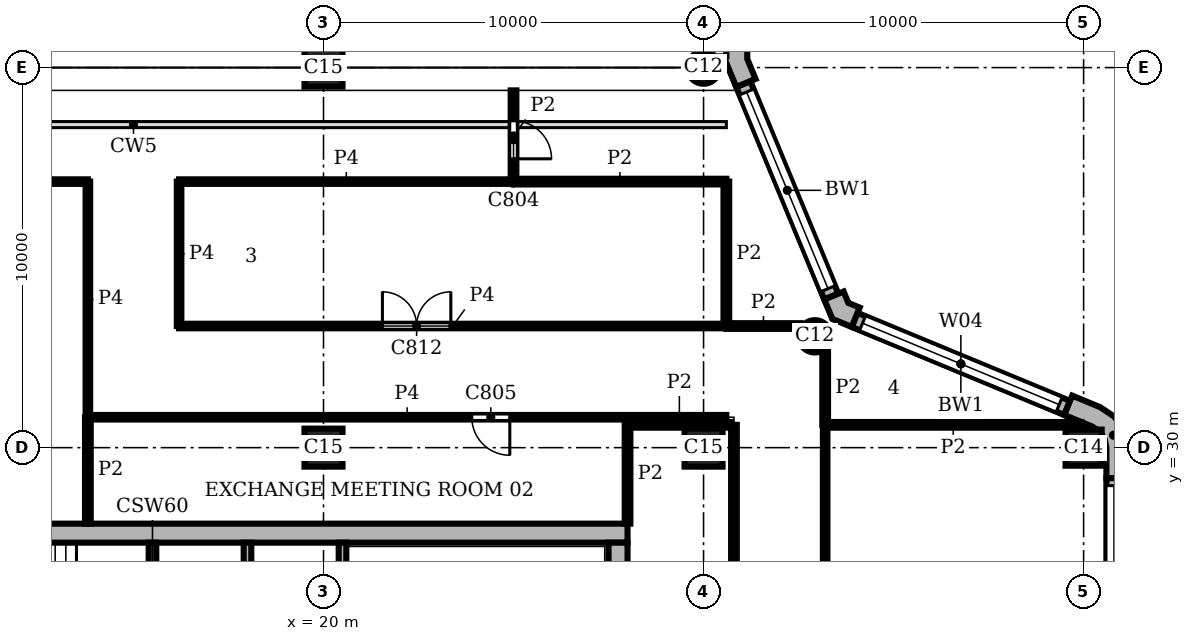
"""IFC4 building model, lengths in metres.
Left out: names, types, materials, properties, quantities, classifications, styles, units other than length and angle.
Written with IfcOpenShell. Run it as: python <this file> out.ifc"""

import sys

from ifc_helpers import new_model, si_unit, direction, frame, frame_2d, origin, origin_2d, place, context, subcontext, project, spatial, polyline, rectangle, circle, outline, extrude, element, fill, save


model = new_model("IFC4")
c1 = context("Model", 3, precision=1e-05, world=origin(), true_north=direction((0.0, 1.0)))
c2 = subcontext(c1, "Body", "Model", "MODEL_VIEW")
j1 = project(units=[si_unit("LENGTHUNIT", "METRE"), si_unit("PLANEANGLEUNIT", "RADIAN")], contexts=[c1])
p1 = place(None, origin())
s1 = spatial("IfcSite", under=j1, at=p1, CompositionType="ELEMENT")
p2 = place(p1, origin())
s2 = spatial("IfcBuilding", under=s1, at=p2, CompositionType="ELEMENT")
p3 = place(p2, frame((0.0, 0.0, 317.7)))
s3 = spatial("IfcBuildingStorey", under=s2, at=p3, CompositionType="ELEMENT", Elevation=317.7)
p4 = place(p3, frame((40.0, 30.0, 0.0), z_axis=(0.0, 0.0, 1.0), x_axis=(1.0, 0.0, 0.0)))
e1 = element("IfcColumn", 1, at=p4, inside=s3, PredefinedType="COLUMN", context=c2, shape_type="SweptSolid", body=[
    extrude(rectangle(XDim=0.95, YDim=0.95, at=origin_2d()), origin(), (0.0, 0.0, 1.0), 3.9),
])
for number, where, z_axis, x_axis in (
    (2, (32.929, 32.929, 0.0), (0.0, 0.0, 1.0), (1.0, 0.0, 0.0)),
    (3, (30.0, 40.0, 0.0), (0.0, 0.0, 1.0), (1.0, 0.0, 0.0)),
):
    element("IfcColumn", number, at=place(p3, frame(where, z_axis=z_axis, x_axis=x_axis)), inside=s3, PredefinedType="COLUMN", context=c2, shape_type="SweptSolid", body=[
        extrude(circle(Radius=0.425, at=origin_2d()), origin(), (0.0, 0.0, 1.0), 3.9),
    ])
for number, where, z_axis, x_axis in (
    (4, (20.0, 30.0, 0.0), (0.0, 0.0, 1.0), (1.0, 0.0, 0.0)),
    (5, (20.0, 40.0, 0.0), (0.0, 0.0, 1.0), (1.0, 0.0, 0.0)),
    (6, (30.0, 30.0, 0.0), (0.0, 0.0, 1.0), (1.0, 0.0, 0.0)),
):
    element("IfcColumn", number, at=place(p3, frame(where, z_axis=z_axis, x_axis=x_axis)), inside=s3, PredefinedType="COLUMN", context=c2, shape_type="SweptSolid", body=[
        extrude(rectangle(XDim=1.0, YDim=1.0, at=origin_2d()), origin(), (0.0, 0.0, 1.0), 3.9),
    ])
p5 = place(p3, frame((27.75, 8.5, 0.0), z_axis=(0.0, 0.0, 1.0), x_axis=(0.0, 1.0, 0.0)))
e7 = element("IfcWall", 7, at=p5, inside=s3, PredefinedType="SHEAR", context=c2, shape_type="SweptSolid", body=[
    extrude(rectangle(XDim=19.0, YDim=0.5, at=frame_2d((9.5, 0.0))), origin(), (0.0, 0.0, 1.0), 3.9),
])
p6 = place(p5, frame((4.95, 0.0, 0.0)))
e8 = element("IfcOpeningElement", 8, at=p6, cuts=e7, PredefinedType="OPENING", context=c2, shape_type="SweptSolid", body=[
    extrude(rectangle(XDim=1.6, YDim=2.1, at=frame_2d((0.8, 1.05))), frame((0.0, 0.26, 0.0), z_axis=(0.0, -1.0, 0.0), x_axis=(1.0, 0.0, 0.0)), (0.0, 0.0, 1.0), 0.52),
])
p7 = place(p3, frame((28.0, 27.75, 0.0), z_axis=(0.0, 0.0, 1.0), x_axis=(-1.0, 0.0, 0.0)))
e9 = element("IfcWall", 9, at=p7, inside=s3, PredefinedType="SHEAR", context=c2, shape_type="SweptSolid", body=[
    extrude(rectangle(XDim=20.0, YDim=0.5, at=frame_2d((10.0, 0.0))), origin(), (0.0, 0.0, 1.0), 3.9),
])
p8 = place(p3, origin())
e10 = element("IfcWall", 10, at=p8, inside=s3, PredefinedType="SOLIDWALL", context=c2, shape_type="SweptSolid", body=[
    extrude(outline(polyline([(41.0, 29.2), (41.15, 29.2), (41.15, 30.0), (41.062, 30.44), (40.813, 30.813), (40.44, 31.062), (39.701, 31.369), (39.644, 31.23), (39.49, 30.861), (40.229, 30.554), (40.424, 30.424), (40.554, 30.229), (40.6, 30.0), (40.6, 29.2), (41.0, 29.2)])), origin(), (0.0, 0.0, 1.0), 3.9),
])
e11 = element("IfcWall", 11, at=p8, inside=s3, PredefinedType="SOLIDWALL", context=c2, shape_type="SweptSolid", body=[
    extrude(outline(polyline([(34.051, 33.547), (34.108, 33.685), (33.809, 33.809), (33.685, 34.108), (33.547, 34.051), (33.177, 33.898), (33.388, 33.388), (33.898, 33.177), (34.051, 33.547)])), origin(), (0.0, 0.0, 1.0), 3.9),
])
e12 = element("IfcWall", 12, at=p8, inside=s3, PredefinedType="SOLIDWALL", context=c2, shape_type="SweptSolid", body=[
    extrude(outline(polyline([(30.62, 39.995), (30.62, 40.071), (30.861, 39.49), (31.23, 39.644), (31.369, 39.701), (31.15, 40.229), (31.15, 40.8), (31.0, 40.8), (30.6, 40.8), (30.6, 40.295), (30.425, 40.295), (30.425, 39.995), (30.62, 39.995)])), origin(), (0.0, 0.0, 1.0), 3.9),
])
p9 = place(p3, frame((40.8, 0.8, 0.0), z_axis=(0.0, 0.0, 1.0), x_axis=(0.0, 1.0, 0.0)))
e13 = element("IfcWall", 13, at=p9, inside=s3, PredefinedType="SOLIDWALL", context=c2, shape_type="SweptSolid", body=[
    extrude(rectangle(XDim=28.4, YDim=0.4, at=frame_2d((14.2, 0.0))), origin(), (0.0, 0.0, 1.0), 3.9),
])
p10 = place(p9, frame((0.2, 0.0, 0.9)))
e14 = element("IfcOpeningElement", 14, at=p10, cuts=e13, PredefinedType="OPENING", context=c2, shape_type="SweptSolid", body=[
    extrude(rectangle(XDim=8.0, YDim=2.35, at=frame_2d((4.0, 1.175))), frame((0.0, 0.21, 0.0), z_axis=(0.0, -1.0, 0.0), x_axis=(1.0, 0.0, 0.0)), (0.0, 0.0, 1.0), 0.42),
])
p11 = place(p9, frame((10.2, 0.0, 0.9)))
e15 = element("IfcOpeningElement", 15, at=p11, cuts=e13, PredefinedType="OPENING", context=c2, shape_type="SweptSolid", body=[
    extrude(rectangle(XDim=8.0, YDim=2.35, at=frame_2d((4.0, 1.175))), frame((0.0, 0.21, 0.0), z_axis=(0.0, -1.0, 0.0), x_axis=(1.0, 0.0, 0.0)), (0.0, 0.0, 1.0), 0.42),
])
p12 = place(p9, frame((20.2, 0.0, 0.9)))
e16 = element("IfcOpeningElement", 16, at=p12, cuts=e13, PredefinedType="OPENING", context=c2, shape_type="SweptSolid", body=[
    extrude(rectangle(XDim=8.0, YDim=2.35, at=frame_2d((4.0, 1.175))), frame((0.0, 0.21, 0.0), z_axis=(0.0, -1.0, 0.0), x_axis=(1.0, 0.0, 0.0)), (0.0, 0.0, 1.0), 0.42),
])
p13 = place(p3, frame((39.567, 31.045, 0.0), z_axis=(0.0, 0.0, 1.0), x_axis=(-0.923891000409, 0.382655745237, 0.0)))
e17 = element("IfcWall", 17, at=p13, inside=s3, PredefinedType="SOLIDWALL", context=c2, shape_type="SweptSolid", body=[
    extrude(rectangle(XDim=6.053, YDim=0.4, at=frame_2d((3.027, 0.0))), origin(), (0.0, 0.0, 1.0), 3.9),
])
p14 = place(p13, frame((0.227, 0.0, 0.9)))
e18 = element("IfcOpeningElement", 18, at=p14, cuts=e17, PredefinedType="OPENING", context=c2, shape_type="SweptSolid", body=[
    extrude(rectangle(XDim=5.6, YDim=2.35, at=frame_2d((2.8, 1.175))), frame((0.0, 0.21, 0.0), z_axis=(0.0, -1.0, 0.0), x_axis=(1.0, 0.0, 0.0)), (0.0, 0.0, 1.0), 0.42),
])
p15 = place(p3, frame((33.362, 33.974, 0.0), z_axis=(0.0, 0.0, 1.0), x_axis=(-0.382655745237, 0.923891000409, 0.0)))
e19 = element("IfcWall", 19, at=p15, inside=s3, PredefinedType="SOLIDWALL", context=c2, shape_type="SweptSolid", body=[
    extrude(rectangle(XDim=6.053, YDim=0.4, at=frame_2d((3.027, 0.0))), origin(), (0.0, 0.0, 1.0), 3.9),
])
p16 = place(p15, frame((0.227, 0.0, 0.9)))
e20 = element("IfcOpeningElement", 20, at=p16, cuts=e19, PredefinedType="OPENING", context=c2, shape_type="SweptSolid", body=[
    extrude(rectangle(XDim=5.6, YDim=2.35, at=frame_2d((2.8, 1.175))), frame((0.0, 0.21, 0.0), z_axis=(0.0, -1.0, 0.0), x_axis=(1.0, 0.0, 0.0)), (0.0, 0.0, 1.0), 0.42),
])
p17 = place(p3, frame((15.5, 23.6, 0.0), z_axis=(0.0, 0.0, 1.0), x_axis=(0.0, 1.0, 0.0)))
e21 = element("IfcWall", 21, at=p17, inside=s3, PredefinedType="SHEAR", context=c2, shape_type="SweptSolid", body=[
    extrude(rectangle(XDim=3.9, YDim=0.2, at=frame_2d((1.95, 0.0))), origin(), (0.0, 0.0, 1.0), 3.58),
])
p18 = place(p3, frame((18.0, 20.0, 0.0), z_axis=(0.0, 0.0, 1.0), x_axis=(0.0, 1.0, 0.0)))
e22 = element("IfcWall", 22, at=p18, inside=s3, PredefinedType="SHEAR", context=c2, shape_type="SweptSolid", body=[
    extrude(rectangle(XDim=7.5, YDim=0.2, at=frame_2d((3.75, 0.0))), origin(), (0.0, 0.0, 1.0), 3.58),
])
p19 = place(p18, frame((1.2, 0.0, 0.0)))
e23 = element("IfcOpeningElement", 23, at=p19, cuts=e22, PredefinedType="OPENING", context=c2, shape_type="SweptSolid", body=[
    extrude(rectangle(XDim=1.2, YDim=2.1, at=frame_2d((0.6, 1.05))), frame((0.0, 0.11, 0.0), z_axis=(0.0, -1.0, 0.0), x_axis=(1.0, 0.0, 0.0)), (0.0, 0.0, 1.0), 0.22),
])
p20 = place(p3, frame((20.5, 23.6, 0.0), z_axis=(0.0, 0.0, 1.0), x_axis=(0.0, 1.0, 0.0)))
e24 = element("IfcWall", 24, at=p20, inside=s3, PredefinedType="SHEAR", context=c2, shape_type="SweptSolid", body=[
    extrude(rectangle(XDim=3.9, YDim=0.2, at=frame_2d((1.95, 0.0))), origin(), (0.0, 0.0, 1.0), 3.58),
])
p21 = place(p3, frame((13.8, 28.0, 0.0), z_axis=(0.0, 0.0, 1.0), x_axis=(0.0, 1.0, 0.0)))
e25 = element("IfcWall", 25, at=p21, inside=s3, PredefinedType="PARTITIONING", context=c2, shape_type="SweptSolid", body=[
    extrude(rectangle(XDim=2.801, YDim=0.15, at=frame_2d((1.4, 0.0))), origin(), (0.0, 0.0, 1.0), 3.58),
])
p22 = place(p3, frame((25.0, 37.0, 0.0), z_axis=(0.0, 0.0, 1.0), x_axis=(0.0, 1.0, 0.0)))
e26 = element("IfcWall", 26, at=p22, inside=s3, PredefinedType="PARTITIONING", context=c2, shape_type="SweptSolid", body=[
    extrude(rectangle(XDim=2.4, YDim=0.15, at=frame_2d((1.2, 0.0))), origin(), (0.0, 0.0, 1.0), 3.58),
])
p23 = place(p22, frame((0.6, 0.0, 0.0)))
e27 = element("IfcOpeningElement", 27, at=p23, cuts=e26, PredefinedType="OPENING", context=c2, shape_type="SweptSolid", body=[
    extrude(rectangle(XDim=1.0, YDim=2.1, at=frame_2d((0.5, 1.05))), frame((0.0, 0.085, 0.0), z_axis=(0.0, -1.0, 0.0), x_axis=(1.0, 0.0, 0.0)), (0.0, 0.0, 1.0), 0.17),
])
p24 = place(p3, frame((28.0, 28.0, 0.0), z_axis=(0.0, 0.0, 1.0), x_axis=(0.0, 1.0, 0.0)))
e28 = element("IfcWall", 28, at=p24, inside=s3, PredefinedType="PARTITIONING", context=c2, shape_type="SweptSolid", body=[
    extrude(rectangle(XDim=2.598, YDim=0.15, at=frame_2d((1.299, 0.0))), origin(), (0.0, 0.0, 1.0), 3.58),
])
p25 = place(p3, frame((30.6, 33.2, 0.0), z_axis=(0.0, 0.0, 1.0), x_axis=(0.0, 1.0, 0.0)))
e29 = element("IfcWall", 29, at=p25, inside=s3, PredefinedType="PARTITIONING", context=c2, shape_type="SweptSolid", body=[
    extrude(rectangle(XDim=3.8, YDim=0.15, at=frame_2d((1.9, 0.0))), origin(), (0.0, 0.0, 1.0), 3.58),
])
p26 = place(p3, frame((30.8, 15.45, 0.0), z_axis=(0.0, 0.0, 1.0), x_axis=(0.0, 1.0, 0.0)))
e30 = element("IfcWall", 30, at=p26, inside=s3, PredefinedType="PARTITIONING", context=c2, shape_type="SweptSolid", body=[
    extrude(rectangle(XDim=15.15, YDim=0.15, at=frame_2d((7.575, 0.0))), origin(), (0.0, 0.0, 1.0), 3.58),
])
p27 = place(p26, frame((7.6, 0.0, 0.0)))
e31 = element("IfcOpeningElement", 31, at=p27, cuts=e30, PredefinedType="OPENING", context=c2, shape_type="SweptSolid", body=[
    extrude(rectangle(XDim=1.0, YDim=2.1, at=frame_2d((0.5, 1.05))), frame((0.0, 0.085, 0.0), z_axis=(0.0, -1.0, 0.0), x_axis=(1.0, 0.0, 0.0)), (0.0, 0.0, 1.0), 0.17),
])
p28 = place(p3, frame((33.2, 30.6, 0.0), z_axis=(0.0, 0.0, 1.0), x_axis=(0.0, 1.0, 0.0)))
e32 = element("IfcWall", 32, at=p28, inside=s3, PredefinedType="PARTITIONING", context=c2, shape_type="SweptSolid", body=[
    extrude(rectangle(XDim=1.952, YDim=0.15, at=frame_2d((0.976, 0.0))), origin(), (0.0, 0.0, 1.0), 3.58),
])
p29 = place(p3, frame((28.002, 30.6, 0.0), z_axis=(0.0, 0.0, 1.0), x_axis=(1.0, 0.0, 0.0)))
e33 = element("IfcWall", 33, at=p29, inside=s3, PredefinedType="PARTITIONING", context=c2, shape_type="SweptSolid", body=[
    extrude(rectangle(XDim=2.723, YDim=0.15, at=frame_2d((1.362, 0.0))), origin(), (0.0, 0.0, 1.0), 3.58),
])
p30 = place(p3, frame((33.2, 30.6, 0.0), z_axis=(0.0, 0.0, 1.0), x_axis=(1.0, 0.0, 0.0)))
e34 = element("IfcWall", 34, at=p30, inside=s3, PredefinedType="PARTITIONING", context=c2, shape_type="SweptSolid", body=[
    extrude(rectangle(XDim=6.738, YDim=0.15, at=frame_2d((3.369, 0.0))), origin(), (0.0, 0.0, 1.0), 3.58),
])
p31 = place(p3, frame((30.6, 33.2, 0.0), z_axis=(0.0, 0.0, 1.0), x_axis=(1.0, 0.0, 0.0)))
e35 = element("IfcWall", 35, at=p31, inside=s3, PredefinedType="PARTITIONING", context=c2, shape_type="SweptSolid", body=[
    extrude(rectangle(XDim=1.952, YDim=0.15, at=frame_2d((0.976, 0.0))), origin(), (0.0, 0.0, 1.0), 3.58),
])
p32 = place(p3, frame((25.0, 37.0, 0.0), z_axis=(0.0, 0.0, 1.0), x_axis=(1.0, 0.0, 0.0)))
e36 = element("IfcWall", 36, at=p32, inside=s3, PredefinedType="PARTITIONING", context=c2, shape_type="SweptSolid", body=[
    extrude(rectangle(XDim=5.6, YDim=0.15, at=frame_2d((2.8, 0.0))), origin(), (0.0, 0.0, 1.0), 3.58),
])
p33 = place(p3, frame((13.8, 30.8, 0.0), z_axis=(0.0, 0.0, 1.0), x_axis=(0.0, 1.0, 0.0)))
e37 = element("IfcWall", 37, at=p33, inside=s3, PredefinedType="PARTITIONING", context=c2, shape_type="SweptSolid", body=[
    extrude(rectangle(XDim=6.2, YDim=0.12, at=frame_2d((3.1, 0.0))), origin(), (0.0, 0.0, 1.0), 3.58),
])
p34 = place(p3, frame((16.2, 33.2, 0.0), z_axis=(0.0, 0.0, 1.0), x_axis=(0.0, 1.0, 0.0)))
e38 = element("IfcWall", 38, at=p34, inside=s3, PredefinedType="PARTITIONING", context=c2, shape_type="SweptSolid", body=[
    extrude(rectangle(XDim=3.8, YDim=0.12, at=frame_2d((1.9, 0.0))), origin(), (0.0, 0.0, 1.0), 3.58),
])
p35 = place(p3, frame((33.2, 8.0, 0.0), z_axis=(0.0, 0.0, 1.0), x_axis=(0.0, 1.0, 0.0)))
e39 = element("IfcWall", 39, at=p35, inside=s3, PredefinedType="PARTITIONING", context=c2, shape_type="SweptSolid", body=[
    extrude(rectangle(XDim=22.6, YDim=0.12, at=frame_2d((11.3, 0.0))), origin(), (0.0, 0.0, 1.0), 3.58),
])
p36 = place(p35, frame((12.6, 0.0, 0.0)))
e40 = element("IfcOpeningElement", 40, at=p36, cuts=e39, PredefinedType="OPENING", context=c2, shape_type="SweptSolid", body=[
    extrude(rectangle(XDim=1.8, YDim=2.1, at=frame_2d((0.9, 1.05))), frame((0.0, 0.07, 0.0), z_axis=(0.0, -1.0, 0.0), x_axis=(1.0, 0.0, 0.0)), (0.0, 0.0, 1.0), 0.14),
])
p37 = place(p3, frame((13.802, 30.8, 0.0), z_axis=(0.0, 0.0, 1.0), x_axis=(1.0, 0.0, 0.0)))
e41 = element("IfcWall", 41, at=p37, inside=s3, PredefinedType="PARTITIONING", context=c2, shape_type="SweptSolid", body=[
    extrude(rectangle(XDim=16.798, YDim=0.12, at=frame_2d((8.399, 0.0))), origin(), (0.0, 0.0, 1.0), 3.58),
])
p38 = place(p37, frame((10.1, 0.0, 0.0)))
e42 = element("IfcOpeningElement", 42, at=p38, cuts=e41, PredefinedType="OPENING", context=c2, shape_type="SweptSolid", body=[
    extrude(rectangle(XDim=1.0, YDim=2.1, at=frame_2d((0.5, 1.05))), frame((0.0, 0.07, 0.0), z_axis=(0.0, -1.0, 0.0), x_axis=(1.0, 0.0, 0.0)), (0.0, 0.0, 1.0), 0.14),
])
p39 = place(p3, frame((16.2, 33.2, 0.0), z_axis=(0.0, 0.0, 1.0), x_axis=(1.0, 0.0, 0.0)))
e43 = element("IfcWall", 43, at=p39, inside=s3, PredefinedType="PARTITIONING", context=c2, shape_type="SweptSolid", body=[
    extrude(rectangle(XDim=14.4, YDim=0.12, at=frame_2d((7.2, 0.0))), origin(), (0.0, 0.0, 1.0), 3.58),
])
p40 = place(p39, frame((5.35, 0.0, 0.0)))
e44 = element("IfcOpeningElement", 44, at=p40, cuts=e43, PredefinedType="OPENING", context=c2, shape_type="SweptSolid", body=[
    extrude(rectangle(XDim=1.8, YDim=2.1, at=frame_2d((0.9, 1.05))), frame((0.0, 0.07, 0.0), z_axis=(0.0, -1.0, 0.0), x_axis=(1.0, 0.0, 0.0)), (0.0, 0.0, 1.0), 0.14),
])
p41 = place(p3, frame((5.0, 37.0, 0.0), z_axis=(0.0, 0.0, 1.0), x_axis=(1.0, 0.0, 0.0)))
e45 = element("IfcWall", 45, at=p41, inside=s3, PredefinedType="PARTITIONING", context=c2, shape_type="SweptSolid", body=[
    extrude(rectangle(XDim=8.8, YDim=0.12, at=frame_2d((4.4, 0.0))), origin(), (0.0, 0.0, 1.0), 3.58),
])
p42 = place(p41, frame((4.1, 0.0, 0.0)))
e46 = element("IfcOpeningElement", 46, at=p42, cuts=e45, PredefinedType="OPENING", context=c2, shape_type="SweptSolid", body=[
    extrude(rectangle(XDim=1.8, YDim=2.1, at=frame_2d((0.9, 1.05))), frame((0.0, 0.07, 0.0), z_axis=(0.0, -1.0, 0.0), x_axis=(1.0, 0.0, 0.0)), (0.0, 0.0, 1.0), 0.14),
])
p43 = place(p3, frame((16.2, 37.0, 0.0), z_axis=(0.0, 0.0, 1.0), x_axis=(1.0, 0.0, 0.0)))
e47 = element("IfcWall", 47, at=p43, inside=s3, PredefinedType="PARTITIONING", context=c2, shape_type="SweptSolid", body=[
    extrude(rectangle(XDim=8.8, YDim=0.12, at=frame_2d((4.4, 0.0))), origin(), (0.0, 0.0, 1.0), 3.58),
])
p44 = place(p12, origin())
e48 = element("IfcWindow", 48, at=p44, inside=s3, PartitioningType="SINGLE_PANEL", PredefinedType="WINDOW", context=c2, shape_type="SweptSolid", body=[
    extrude(rectangle(XDim=8.0, YDim=2.35, at=frame_2d((4.0, 1.175))), frame((0.0, 0.16, 0.0), z_axis=(0.0, -1.0, 0.0), x_axis=(1.0, 0.0, 0.0)), (0.0, 0.0, 1.0), 0.06),
])
fill(e16, e48)
p45 = place(p14, origin())
e49 = element("IfcWindow", 49, at=p45, inside=s3, PartitioningType="SINGLE_PANEL", PredefinedType="WINDOW", context=c2, shape_type="SweptSolid", body=[
    extrude(rectangle(XDim=5.6, YDim=2.35, at=frame_2d((2.8, 1.175))), frame((0.0, 0.16, 0.0), z_axis=(0.0, -1.0, 0.0), x_axis=(1.0, 0.0, 0.0)), (0.0, 0.0, 1.0), 0.06),
])
fill(e18, e49)
p46 = place(p16, origin())
e50 = element("IfcWindow", 50, at=p46, inside=s3, PartitioningType="SINGLE_PANEL", PredefinedType="WINDOW", context=c2, shape_type="SweptSolid", body=[
    extrude(rectangle(XDim=5.6, YDim=2.35, at=frame_2d((2.8, 1.175))), frame((0.0, 0.16, 0.0), z_axis=(0.0, -1.0, 0.0), x_axis=(1.0, 0.0, 0.0)), (0.0, 0.0, 1.0), 0.06),
])
fill(e20, e50)
p47 = place(p23, frame((1.0, 0.0, 0.0), z_axis=(0.0, 0.0, 1.0), x_axis=(-1.0, 0.0, 0.0)))
e51 = element("IfcDoor", 51, at=p47, inside=s3, OperationType="SINGLE_SWING_RIGHT", PredefinedType="DOOR", context=c2, shape_type="SweptSolid", body=[
    extrude(rectangle(XDim=1.0, YDim=2.1, at=frame_2d((0.5, 1.05))), frame((0.0, 0.025, 0.0), z_axis=(0.0, -1.0, 0.0), x_axis=(1.0, 0.0, 0.0)), (0.0, 0.0, 1.0), 0.05),
])
fill(e27, e51)
p48 = place(p38, frame((1.0, 0.0, 0.0), z_axis=(0.0, 0.0, 1.0), x_axis=(-1.0, 0.0, 0.0)))
e52 = element("IfcDoor", 52, at=p48, inside=s3, OperationType="SINGLE_SWING_LEFT", PredefinedType="DOOR", context=c2, shape_type="SweptSolid", body=[
    extrude(rectangle(XDim=1.0, YDim=2.1, at=frame_2d((0.5, 1.05))), frame((0.0, 0.025, 0.0), z_axis=(0.0, -1.0, 0.0), x_axis=(1.0, 0.0, 0.0)), (0.0, 0.0, 1.0), 0.05),
])
fill(e42, e52)
p49 = place(p40, origin())
e53 = element("IfcDoor", 53, at=p49, inside=s3, OperationType="DOUBLE_DOOR_SINGLE_SWING", PredefinedType="DOOR", context=c2, shape_type="SweptSolid", body=[
    extrude(rectangle(XDim=1.8, YDim=2.1, at=frame_2d((0.9, 1.05))), frame((0.0, 0.025, 0.0), z_axis=(0.0, -1.0, 0.0), x_axis=(1.0, 0.0, 0.0)), (0.0, 0.0, 1.0), 0.05),
])
fill(e44, e53)
save(model, sys.argv[1])
